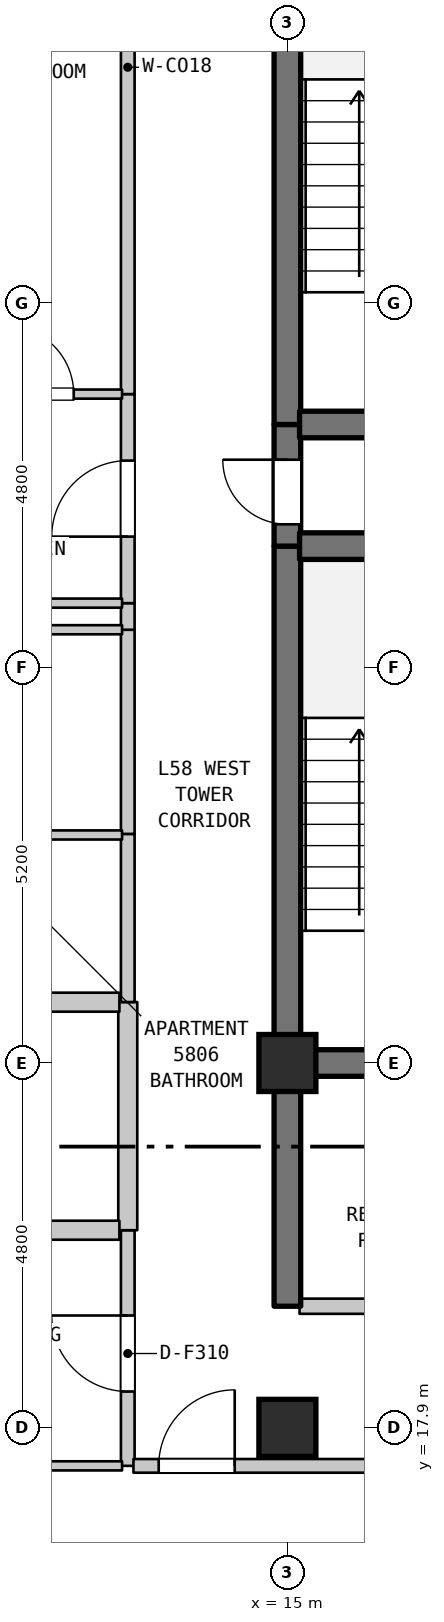
"""IFC4 building model, lengths in metres.
Left out: names, types, materials, properties, quantities, classifications, styles, units other than length and angle.
Written with IfcOpenShell. Run it as: python <this file> out.ifc"""

import sys

from ifc_helpers import new_model, si_unit, direction, frame, frame_2d, origin, origin_2d, place, context, subcontext, project, spatial, rectangle, extrude, element, fill, save


model = new_model("IFC4")
c1 = context("Model", 3, precision=1e-05, world=origin(), true_north=direction((0.0, 1.0)))
c2 = subcontext(c1, "Body", "Model", "MODEL_VIEW")
j1 = project(units=[si_unit("LENGTHUNIT", "METRE"), si_unit("PLANEANGLEUNIT", "RADIAN")], contexts=[c1])
p1 = place(None, origin())
s1 = spatial("IfcSite", under=j1, at=p1, CompositionType="ELEMENT")
p2 = place(p1, origin())
s2 = spatial("IfcBuilding", under=s1, at=p2, CompositionType="ELEMENT")
p3 = place(p2, frame((0.0, 0.0, 233.9)))
s3 = spatial("IfcBuildingStorey", under=s2, at=p3, CompositionType="ELEMENT", Elevation=233.9)
for number, where, z_axis, x_axis in (
    (1, (15.0, 17.9, 0.0), (0.0, 0.0, 1.0), (1.0, 0.0, 0.0)),
    (2, (15.0, 22.7, 0.0), (0.0, 0.0, 1.0), (1.0, 0.0, 0.0)),
):
    element("IfcColumn", number, at=place(p3, frame(where, z_axis=z_axis, x_axis=x_axis)), inside=s3, PredefinedType="COLUMN", context=c2, shape_type="SweptSolid", body=[
        extrude(rectangle(XDim=0.75, YDim=0.75, at=origin_2d()), origin(), (0.0, 0.0, 1.0), 3.7),
    ])
p4 = place(p3, frame((12.9, 17.4, 0.0), z_axis=(0.0, 0.0, 1.0), x_axis=(0.0, 1.0, 0.0)))
e3 = element("IfcWall", 3, at=p4, inside=s3, PredefinedType="STANDARD", context=c2, shape_type="SweptSolid", body=[
    extrude(rectangle(XDim=3.1, YDim=0.18, at=frame_2d((1.55, 0.0))), origin(), (0.0, 0.0, 1.0), 3.28),
])
p5 = place(p4, frame((0.978, 0.0, 0.0)))
e4 = element("IfcOpeningElement", 4, at=p5, cuts=e3, PredefinedType="OPENING", context=c2, shape_type="SweptSolid", body=[
    extrude(rectangle(XDim=1.0, YDim=2.15, at=frame_2d((0.5, 1.075))), frame((0.0, 0.1, 0.0), z_axis=(0.0, -1.0, 0.0), x_axis=(1.0, 0.0, 0.0)), (0.0, 0.0, 1.0), 0.2),
])
p6 = place(p3, frame((12.9, 20.5, 0.0), z_axis=(0.0, 0.0, 1.0), x_axis=(0.0, 1.0, 0.0)))
e5 = element("IfcWall", 5, at=p6, inside=s3, PredefinedType="STANDARD", context=c2, shape_type="SweptSolid", body=[
    extrude(rectangle(XDim=3.002, YDim=0.25, at=frame_2d((1.501, 0.0))), origin(), (0.0, 0.0, 1.0), 3.28),
])
p7 = place(p3, frame((12.9, 23.502, 0.0), z_axis=(0.0, 0.0, 1.0), x_axis=(0.0, 1.0, 0.0)))
e6 = element("IfcWall", 6, at=p7, inside=s3, PredefinedType="STANDARD", context=c2, shape_type="SweptSolid", body=[
    extrude(rectangle(XDim=2.212, YDim=0.18, at=frame_2d((1.106, 0.0))), origin(), (0.0, 0.0, 1.0), 3.28),
])
p8 = place(p3, frame((12.9, 25.714, 0.0), z_axis=(0.0, 0.0, 1.0), x_axis=(0.0, 1.0, 0.0)))
e7 = element("IfcWall", 7, at=p8, inside=s3, PredefinedType="STANDARD", context=c2, shape_type="SweptSolid", body=[
    extrude(rectangle(XDim=2.686, YDim=0.18, at=frame_2d((1.343, 0.0))), origin(), (0.0, 0.0, 1.0), 3.28),
])
p9 = place(p3, frame((12.9, 28.4, 0.0), z_axis=(0.0, 0.0, 1.0), x_axis=(0.0, 1.0, 0.0)))
e8 = element("IfcWall", 8, at=p9, inside=s3, PredefinedType="STANDARD", context=c2, shape_type="SweptSolid", body=[
    extrude(rectangle(XDim=0.35, YDim=0.18, at=frame_2d((0.175, 0.0))), origin(), (0.0, 0.0, 1.0), 3.28),
])
p10 = place(p3, frame((12.9, 28.75, 0.0), z_axis=(0.0, 0.0, 1.0), x_axis=(0.0, 1.0, 0.0)))
e9 = element("IfcWall", 9, at=p10, inside=s3, PredefinedType="STANDARD", context=c2, shape_type="SweptSolid", body=[
    extrude(rectangle(XDim=2.75, YDim=0.18, at=frame_2d((1.375, 0.0))), origin(), (0.0, 0.0, 1.0), 3.28),
])
p11 = place(p10, frame((0.875, 0.0, 0.0)))
e10 = element("IfcOpeningElement", 10, at=p11, cuts=e9, PredefinedType="OPENING", context=c2, shape_type="SweptSolid", body=[
    extrude(rectangle(XDim=1.0, YDim=2.15, at=frame_2d((0.5, 1.075))), frame((0.0, 0.1, 0.0), z_axis=(0.0, -1.0, 0.0), x_axis=(1.0, 0.0, 0.0)), (0.0, 0.0, 1.0), 0.2),
])
p12 = place(p3, frame((12.9, 31.5, 0.0), z_axis=(0.0, 0.0, 1.0), x_axis=(0.0, 1.0, 0.0)))
e11 = element("IfcWall", 11, at=p12, inside=s3, PredefinedType="STANDARD", context=c2, shape_type="SweptSolid", body=[
    extrude(rectangle(XDim=8.6, YDim=0.18, at=frame_2d((4.3, 0.0))), origin(), (0.0, 0.0, 1.0), 3.28),
])
p13 = place(p3, frame((15.0, 19.5, 0.0), z_axis=(0.0, 0.0, 1.0), x_axis=(0.0, 1.0, 0.0)))
e12 = element("IfcWall", 12, at=p13, inside=s3, PredefinedType="SHEAR", context=c2, shape_type="SweptSolid", body=[
    extrude(rectangle(XDim=3.2, YDim=0.35, at=frame_2d((1.6, 0.0))), origin(), (0.0, 0.0, 1.0), 3.28),
])
p14 = place(p3, frame((15.0, 22.7, 0.0), z_axis=(0.0, 0.0, 1.0), x_axis=(0.0, 1.0, 0.0)))
e13 = element("IfcWall", 13, at=p14, inside=s3, PredefinedType="SHEAR", context=c2, shape_type="SweptSolid", body=[
    extrude(rectangle(XDim=6.8, YDim=0.35, at=frame_2d((3.4, 0.0))), origin(), (0.0, 0.0, 1.0), 3.28),
])
p15 = place(p3, frame((15.0, 29.5, 0.0), z_axis=(0.0, 0.0, 1.0), x_axis=(0.0, 1.0, 0.0)))
e14 = element("IfcWall", 14, at=p15, inside=s3, PredefinedType="SHEAR", context=c2, shape_type="SweptSolid", body=[
    extrude(rectangle(XDim=1.6, YDim=0.35, at=frame_2d((0.8, 0.0))), origin(), (0.0, 0.0, 1.0), 3.28),
])
p16 = place(p15, frame((0.287, 0.0, 0.0)))
e15 = element("IfcOpeningElement", 15, at=p16, cuts=e14, PredefinedType="OPENING", context=c2, shape_type="SweptSolid", body=[
    extrude(rectangle(XDim=0.85, YDim=2.1, at=frame_2d((0.425, 1.05))), frame((0.0, 0.185, 0.0), z_axis=(0.0, -1.0, 0.0), x_axis=(1.0, 0.0, 0.0)), (0.0, 0.0, 1.0), 0.37),
])
p17 = place(p3, frame((15.0, 31.1, 0.0), z_axis=(0.0, 0.0, 1.0), x_axis=(0.0, 1.0, 0.0)))
e16 = element("IfcWall", 16, at=p17, inside=s3, PredefinedType="SHEAR", context=c2, shape_type="SweptSolid", body=[
    extrude(rectangle(XDim=6.8, YDim=0.35, at=frame_2d((3.4, 0.0))), origin(), (0.0, 0.0, 1.0), 3.28),
])
p18 = place(p3, frame((8.972, 17.4, 0.0), z_axis=(0.0, 0.0, 1.0), x_axis=(1.0, 0.0, 0.0)))
e17 = element("IfcWall", 17, at=p18, inside=s3, PredefinedType="PARTITIONING", context=c2, shape_type="SweptSolid", body=[
    extrude(rectangle(XDim=3.853, YDim=0.12, at=frame_2d((1.927, 0.0))), origin(), (0.0, 0.0, 1.0), 3.28),
])
p19 = place(p3, frame((12.975, 17.4, 0.0), z_axis=(0.0, 0.0, 1.0), x_axis=(1.0, 0.0, 0.0)))
e18 = element("IfcWall", 18, at=p19, inside=s3, PredefinedType="STANDARD", context=c2, shape_type="SweptSolid", body=[
    extrude(rectangle(XDim=3.18, YDim=0.18, at=frame_2d((1.59, 0.0))), origin(), (0.0, 0.0, 1.0), 3.28),
])
p20 = place(p19, frame((0.332, 0.0, 0.0)))
e19 = element("IfcOpeningElement", 19, at=p20, cuts=e18, PredefinedType="OPENING", context=c2, shape_type="SweptSolid", body=[
    extrude(rectangle(XDim=1.0, YDim=2.15, at=frame_2d((0.5, 1.075))), frame((0.0, 0.1, 0.0), z_axis=(0.0, -1.0, 0.0), x_axis=(1.0, 0.0, 0.0)), (0.0, 0.0, 1.0), 0.2),
])
p21 = place(p3, frame((15.16, 19.5, 0.0), z_axis=(0.0, 0.0, 1.0), x_axis=(1.0, 0.0, 0.0)))
e20 = element("IfcWall", 20, at=p21, inside=s3, PredefinedType="STANDARD", context=c2, shape_type="SweptSolid", body=[
    extrude(rectangle(XDim=3.68, YDim=0.2, at=frame_2d((1.84, 0.0))), origin(), (0.0, 0.0, 1.0), 3.28),
])
p22 = place(p21, frame((1.39, 0.0, 0.0)))
e21 = element("IfcOpeningElement", 21, at=p22, cuts=e20, PredefinedType="OPENING", context=c2, shape_type="SweptSolid", body=[
    extrude(rectangle(XDim=0.9, YDim=2.15, at=frame_2d((0.45, 1.075))), frame((0.0, 0.11, 0.0), z_axis=(0.0, -1.0, 0.0), x_axis=(1.0, 0.0, 0.0)), (0.0, 0.0, 1.0), 0.22),
])
p23 = place(p3, frame((10.76, 20.5, 0.0), z_axis=(0.0, 0.0, 1.0), x_axis=(1.0, 0.0, 0.0)))
e22 = element("IfcWall", 22, at=p23, inside=s3, PredefinedType="STANDARD", context=c2, shape_type="SweptSolid", body=[
    extrude(rectangle(XDim=2.03, YDim=0.25, at=frame_2d((1.015, 0.0))), origin(), (0.0, 0.0, 1.0), 3.28),
])
p24 = place(p3, frame((15.16, 22.7, 0.0), z_axis=(0.0, 0.0, 1.0), x_axis=(1.0, 0.0, 0.0)))
e23 = element("IfcWall", 23, at=p24, inside=s3, PredefinedType="SHEAR", context=c2, shape_type="SweptSolid", body=[
    extrude(rectangle(XDim=3.68, YDim=0.35, at=frame_2d((1.84, 0.0))), origin(), (0.0, 0.0, 1.0), 3.28),
])
p25 = place(p3, frame((10.76, 23.5, 0.0), z_axis=(0.0, 0.0, 1.0), x_axis=(1.0, 0.0, 0.0)))
e24 = element("IfcWall", 24, at=p25, inside=s3, PredefinedType="STANDARD", context=c2, shape_type="SweptSolid", body=[
    extrude(rectangle(XDim=2.03, YDim=0.25, at=frame_2d((1.015, 0.0))), origin(), (0.0, 0.0, 1.0), 3.28),
])
for number, where, z_axis, x_axis in (
    (25, (10.695, 25.7, 0.0), (0.0, 0.0, 1.0), (1.0, 0.0, 0.0)),
    (26, (10.695, 28.4, 0.0), (0.0, 0.0, 1.0), (1.0, 0.0, 0.0)),
):
    element("IfcWall", number, at=place(p3, frame(where, z_axis=z_axis, x_axis=x_axis)), inside=s3, PredefinedType="PARTITIONING", context=c2, shape_type="SweptSolid", body=[
        extrude(rectangle(XDim=2.13, YDim=0.12, at=frame_2d((1.065, 0.0))), origin(), (0.0, 0.0, 1.0), 3.28),
    ])
p26 = place(p3, frame((9.175, 28.75, 0.0), z_axis=(0.0, 0.0, 1.0), x_axis=(1.0, 0.0, 0.0)))
e27 = element("IfcWall", 27, at=p26, inside=s3, PredefinedType="PARTITIONING", context=c2, shape_type="SweptSolid", body=[
    extrude(rectangle(XDim=3.65, YDim=0.12, at=frame_2d((1.825, 0.0))), origin(), (0.0, 0.0, 1.0), 3.28),
])
for number, where, z_axis, x_axis in (
    (28, (15.16, 29.5, 0.0), (0.0, 0.0, 1.0), (1.0, 0.0, 0.0)),
    (29, (15.16, 31.1, 0.0), (0.0, 0.0, 1.0), (1.0, 0.0, 0.0)),
):
    element("IfcWall", number, at=place(p3, frame(where, z_axis=z_axis, x_axis=x_axis)), inside=s3, PredefinedType="SHEAR", context=c2, shape_type="SweptSolid", body=[
        extrude(rectangle(XDim=3.68, YDim=0.35, at=frame_2d((1.84, 0.0))), origin(), (0.0, 0.0, 1.0), 3.28),
    ])
p27 = place(p3, frame((10.623, 31.5, 0.0), z_axis=(0.0, 0.0, 1.0), x_axis=(1.0, 0.0, 0.0)))
e30 = element("IfcWall", 30, at=p27, inside=s3, PredefinedType="PARTITIONING", context=c2, shape_type="SweptSolid", body=[
    extrude(rectangle(XDim=2.202, YDim=0.12, at=frame_2d((1.101, 0.0))), origin(), (0.0, 0.0, 1.0), 3.28),
])
p28 = place(p27, frame((0.666, 0.0, 0.0)))
e31 = element("IfcOpeningElement", 31, at=p28, cuts=e30, PredefinedType="OPENING", context=c2, shape_type="SweptSolid", body=[
    extrude(rectangle(XDim=0.9, YDim=2.1, at=frame_2d((0.45, 1.05))), frame((0.0, 0.07, 0.0), z_axis=(0.0, -1.0, 0.0), x_axis=(1.0, 0.0, 0.0)), (0.0, 0.0, 1.0), 0.14),
])
p29 = place(p5, origin())
e32 = element("IfcDoor", 32, at=p29, inside=s3, OperationType="SINGLE_SWING_RIGHT", PredefinedType="DOOR", context=c2, shape_type="SweptSolid", body=[
    extrude(rectangle(XDim=1.0, YDim=2.15, at=frame_2d((0.5, 1.075))), frame((0.0, 0.025, 0.0), z_axis=(0.0, -1.0, 0.0), x_axis=(1.0, 0.0, 0.0)), (0.0, 0.0, 1.0), 0.05),
])
fill(e4, e32)
p30 = place(p11, origin())
e33 = element("IfcDoor", 33, at=p30, inside=s3, OperationType="SINGLE_SWING_LEFT", PredefinedType="DOOR", context=c2, shape_type="SweptSolid", body=[
    extrude(rectangle(XDim=1.0, YDim=2.15, at=frame_2d((0.5, 1.075))), frame((0.0, 0.025, 0.0), z_axis=(0.0, -1.0, 0.0), x_axis=(1.0, 0.0, 0.0)), (0.0, 0.0, 1.0), 0.05),
])
fill(e10, e33)
p31 = place(p16, origin())
e34 = element("IfcDoor", 34, at=p31, inside=s3, OperationType="SINGLE_SWING_RIGHT", PredefinedType="DOOR", context=c2, shape_type="SweptSolid", body=[
    extrude(rectangle(XDim=0.85, YDim=2.1, at=frame_2d((0.425, 1.05))), frame((0.0, 0.025, 0.0), z_axis=(0.0, -1.0, 0.0), x_axis=(1.0, 0.0, 0.0)), (0.0, 0.0, 1.0), 0.05),
])
fill(e15, e34)
p32 = place(p20, origin())
e35 = element("IfcDoor", 35, at=p32, inside=s3, OperationType="SINGLE_SWING_RIGHT", PredefinedType="DOOR", context=c2, shape_type="SweptSolid", body=[
    extrude(rectangle(XDim=1.0, YDim=2.15, at=frame_2d((0.5, 1.075))), frame((0.0, 0.025, 0.0), z_axis=(0.0, -1.0, 0.0), x_axis=(1.0, 0.0, 0.0)), (0.0, 0.0, 1.0), 0.05),
])
fill(e19, e35)
p33 = place(p28, origin())
e36 = element("IfcDoor", 36, at=p33, inside=s3, OperationType="SINGLE_SWING_LEFT", PredefinedType="DOOR", context=c2, shape_type="SweptSolid", body=[
    extrude(rectangle(XDim=0.9, YDim=2.1, at=frame_2d((0.45, 1.05))), frame((0.0, 0.025, 0.0), z_axis=(0.0, -1.0, 0.0), x_axis=(1.0, 0.0, 0.0)), (0.0, 0.0, 1.0), 0.05),
])
fill(e31, e36)
save(model, sys.argv[1])
